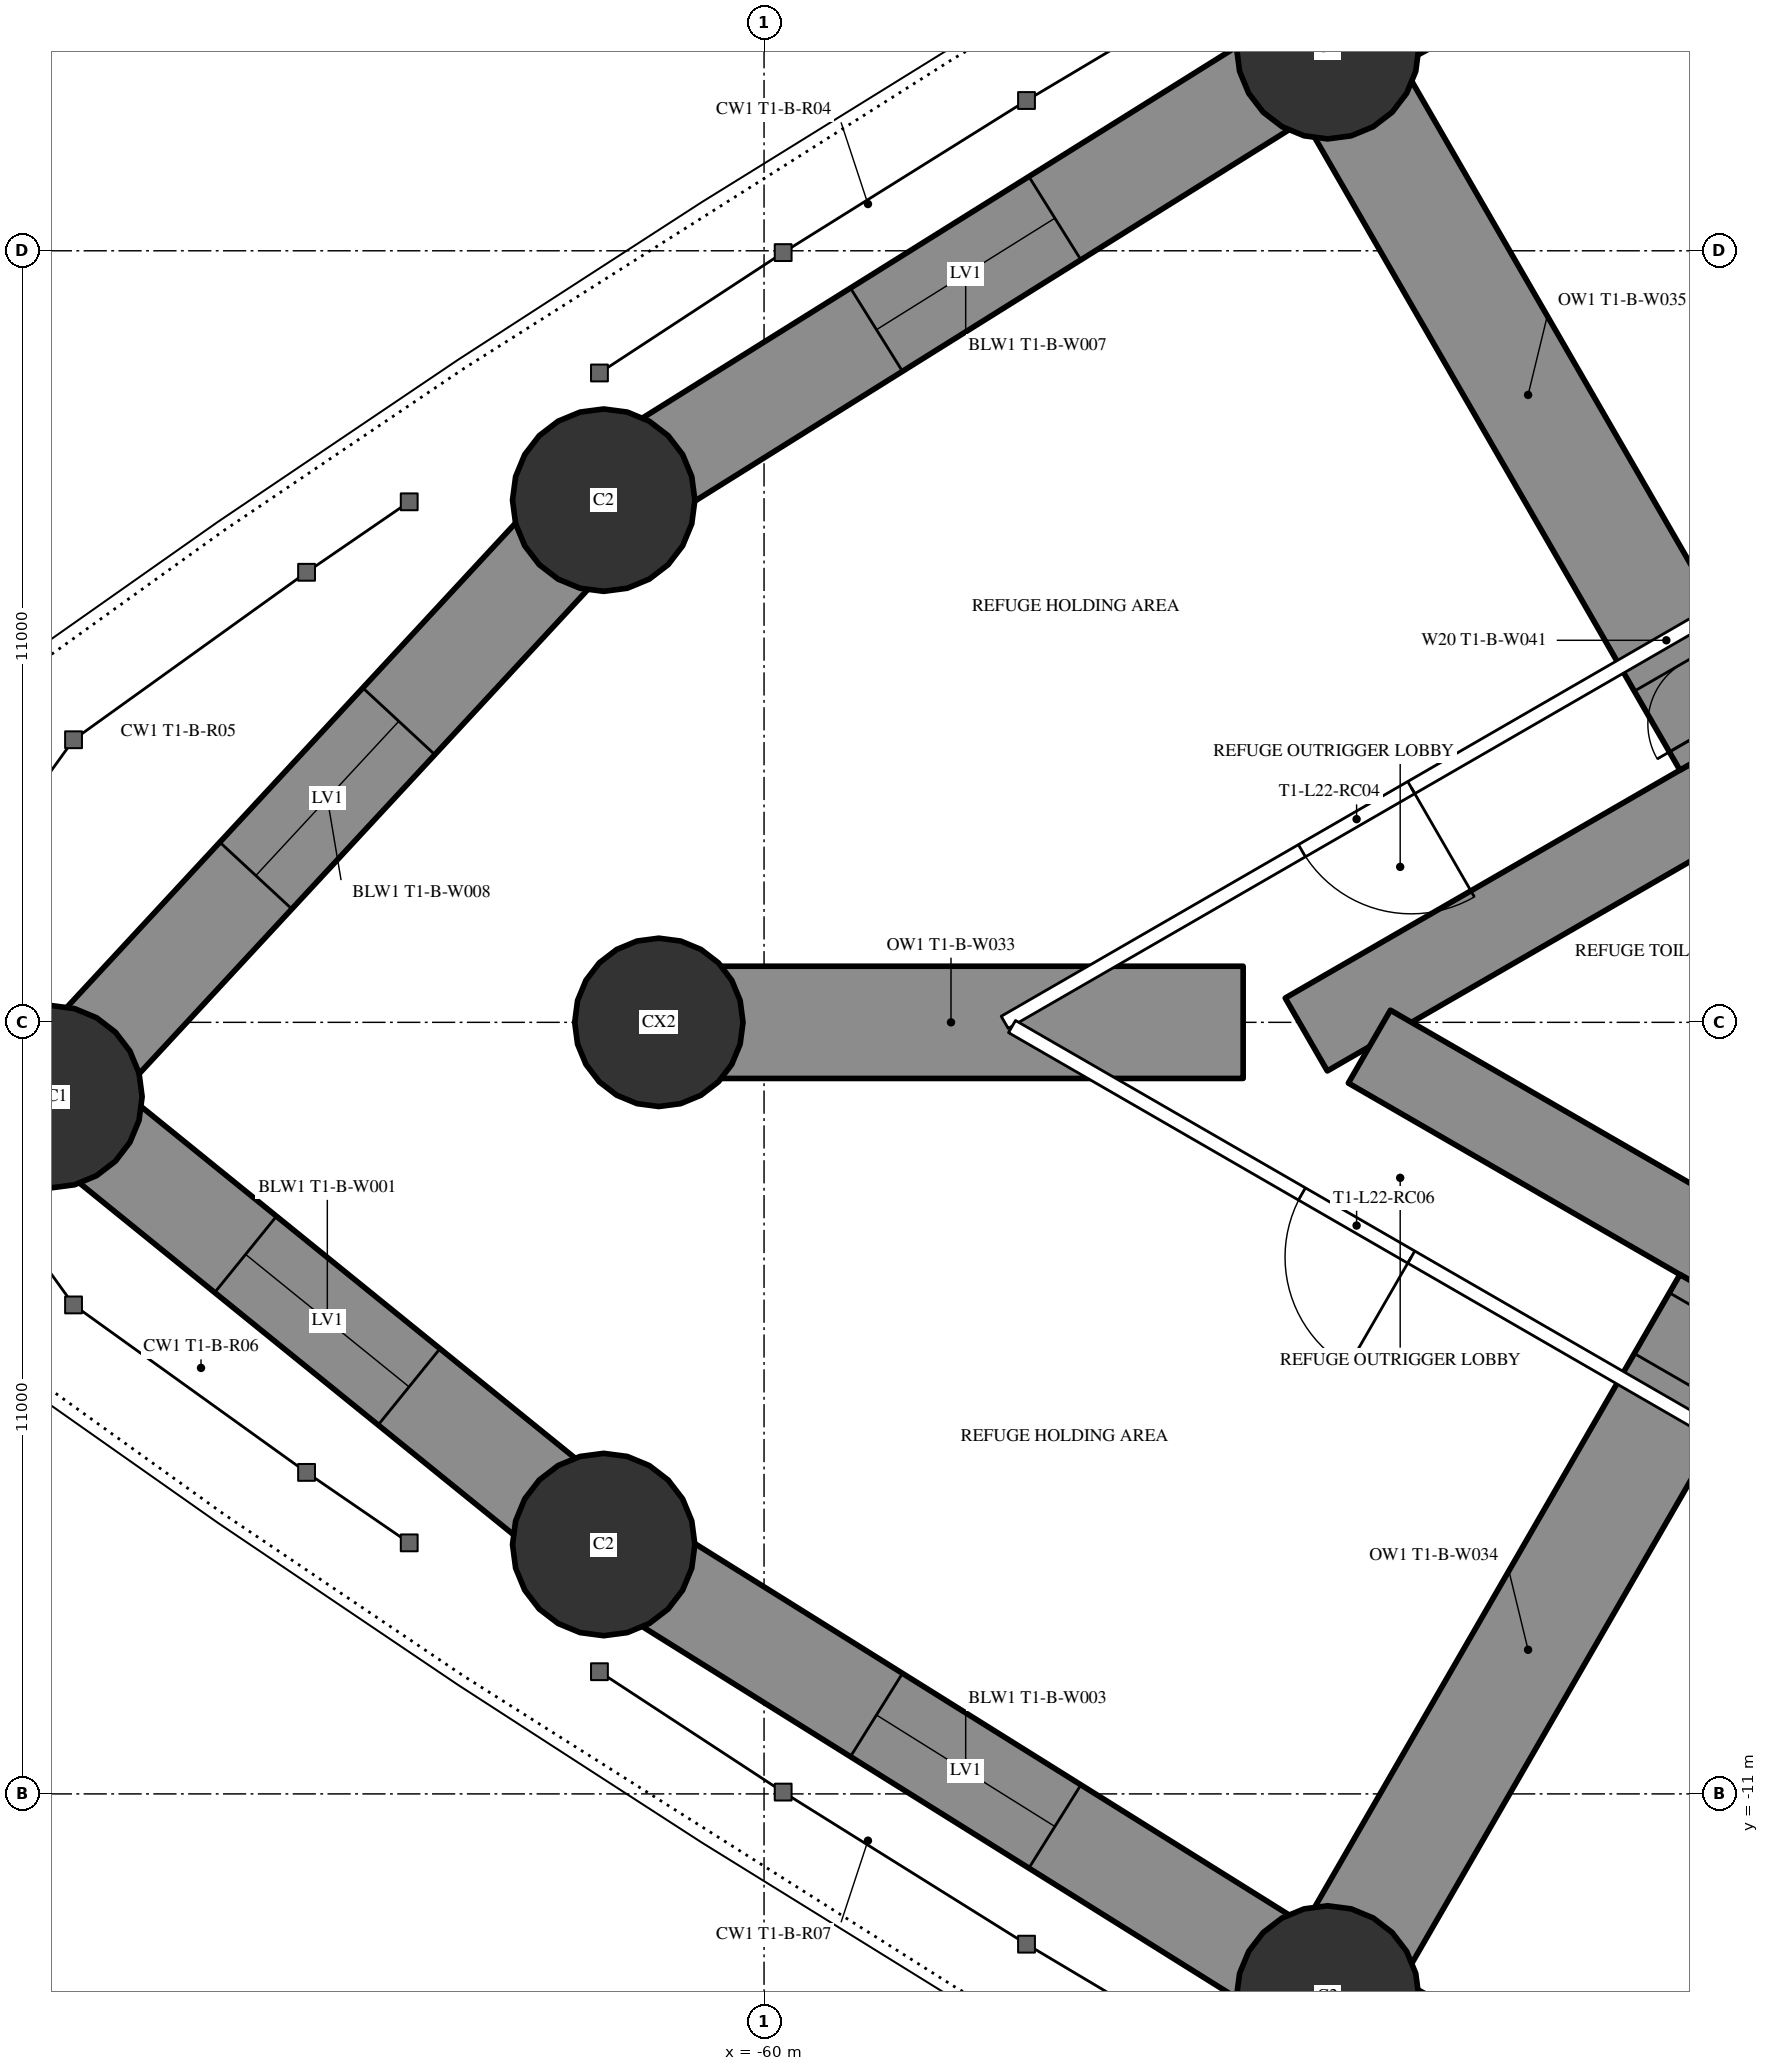
"""IFC4 building model, lengths in metres.
Left out: names, types, materials, properties, quantities, classifications, styles, units other than length and angle.
Written with IfcOpenShell. Run it as: python <this file> out.ifc"""

import sys

from ifc_helpers import new_model, si_unit, direction, frame, frame_2d, origin, origin_2d, place, context, subcontext, project, spatial, rectangle, circle, hollow_circle, extrude, element, fill, save


model = new_model("IFC4")
c1 = context("Model", 3, precision=1e-05, world=origin(), true_north=direction((0.0, 1.0)))
c2 = subcontext(c1, "Body", "Model", "MODEL_VIEW")
j1 = project(units=[si_unit("LENGTHUNIT", "METRE"), si_unit("PLANEANGLEUNIT", "RADIAN")], contexts=[c1])
p1 = place(None, origin())
s1 = spatial("IfcSite", under=j1, at=p1, CompositionType="ELEMENT")
p2 = place(p1, origin())
s2 = spatial("IfcBuilding", under=s1, at=p2, CompositionType="ELEMENT")
p3 = place(p2, frame((0.0, 0.0, 87.0)))
s3 = spatial("IfcBuildingStorey", under=s2, at=p3, CompositionType="ELEMENT", Elevation=87.0)
for number, where, z_axis, x_axis in (
    (1, (-70.168, -1.06, 0.0), (0.0, 0.0, 1.0), (1.0, 0.0, 0.0)),
    (2, (-62.287, -7.445, 0.0), (0.0, 0.0, 1.0), (1.0, 0.0, 0.0)),
    (3, (-51.963, -13.895, 0.0), (0.0, 0.0, 1.0), (1.0, 0.0, 0.0)),
    (4, (-51.963, 13.895, 0.0), (0.0, 0.0, 1.0), (1.0, 0.0, 0.0)),
    (5, (-62.287, 7.445, 0.0), (0.0, 0.0, 1.0), (1.0, 0.0, 0.0)),
):
    element("IfcColumn", number, at=place(p3, frame(where, z_axis=z_axis, x_axis=x_axis)), inside=s3, PredefinedType="COLUMN", context=c2, shape_type="SweptSolid", body=[
        extrude(hollow_circle(Radius=1.3, WallThickness=0.1, at=origin_2d()), origin(), (0.0, 0.0, 1.0), 3.6),
    ])
p4 = place(p3, frame((-61.5, 0.0, 0.0), z_axis=(0.0, 0.0, 1.0), x_axis=(1.0, 0.0, 0.0)))
e6 = element("IfcColumn", 6, at=p4, inside=s3, PredefinedType="COLUMN", context=c2, shape_type="SweptSolid", body=[
    extrude(circle(Radius=1.2, at=origin_2d()), origin(), (0.0, 0.0, 1.0), 3.6),
])
p5 = place(p3, frame((-27.2, 14.3, 0.0), z_axis=(0.0, 0.0, 1.0), x_axis=(-0.866026593062, -0.499997940104, 0.0)))
e7 = element("IfcWall", 7, at=p5, inside=s3, PredefinedType="SHEAR", context=c2, shape_type="SweptSolid", body=[
    extrude(rectangle(XDim=28.946, YDim=1.2, at=frame_2d((14.473, 0.0))), origin(), (0.0, 0.0, 1.0), 3.6),
])
p6 = place(p5, frame((4.6, 0.0, 0.0)))
e8 = element("IfcOpeningElement", 8, at=p6, cuts=e7, PredefinedType="OPENING", context=c2, shape_type="SweptSolid", body=[
    extrude(rectangle(XDim=1.0, YDim=2.2, at=frame_2d((0.5, 1.1))), frame((0.0, 0.61, 0.0), z_axis=(0.0, -1.0, 0.0), x_axis=(1.0, 0.0, 0.0)), (0.0, 0.0, 1.0), 1.22),
])
p7 = place(p5, frame((13.568, 0.0, 0.0)))
e9 = element("IfcOpeningElement", 9, at=p7, cuts=e7, PredefinedType="OPENING", context=c2, shape_type="SweptSolid", body=[
    extrude(rectangle(XDim=1.8, YDim=2.03, at=frame_2d((0.9, 1.015))), frame((0.0, 0.61, 0.0), z_axis=(0.0, -1.0, 0.0), x_axis=(1.0, 0.0, 0.0)), (0.0, 0.0, 1.0), 1.22),
])
p8 = place(p3, frame((-27.2, -14.3, 0.0), z_axis=(0.0, 0.0, 1.0), x_axis=(-0.866024021859, 0.500002393557, 0.0)))
e10 = element("IfcWall", 10, at=p8, inside=s3, PredefinedType="SHEAR", context=c2, shape_type="SweptSolid", body=[
    extrude(rectangle(XDim=27.907, YDim=1.2, at=frame_2d((13.954, 0.0))), origin(), (0.0, 0.0, 1.0), 3.6),
])
p9 = place(p8, frame((4.6, 0.0, 0.0)))
e11 = element("IfcOpeningElement", 11, at=p9, cuts=e10, PredefinedType="OPENING", context=c2, shape_type="SweptSolid", body=[
    extrude(rectangle(XDim=1.0, YDim=2.2, at=frame_2d((0.5, 1.1))), frame((0.0, 0.61, 0.0), z_axis=(0.0, -1.0, 0.0), x_axis=(1.0, 0.0, 0.0)), (0.0, 0.0, 1.0), 1.22),
])
p10 = place(p8, frame((13.818, 0.0, 0.0)))
e12 = element("IfcOpeningElement", 12, at=p10, cuts=e10, PredefinedType="OPENING", context=c2, shape_type="SweptSolid", body=[
    extrude(rectangle(XDim=1.8, YDim=2.2, at=frame_2d((0.9, 1.1))), frame((0.0, 0.61, 0.0), z_axis=(0.0, -1.0, 0.0), x_axis=(1.0, 0.0, 0.0)), (0.0, 0.0, 1.0), 1.22),
])
p11 = place(p3, frame((-46.248, 3.996, 0.0), z_axis=(0.0, 0.0, 1.0), x_axis=(-0.499993613132, 0.866029091213, 0.0)))
e13 = element("IfcWall", 13, at=p11, inside=s3, PredefinedType="SHEAR", context=c2, shape_type="SweptSolid", body=[
    extrude(rectangle(XDim=11.431, YDim=1.6, at=frame_2d((5.715, 0.0))), origin(), (0.0, 0.0, 1.0), 3.6),
])
p12 = place(p11, frame((0.3, 0.0, 0.0)))
e14 = element("IfcOpeningElement", 14, at=p12, cuts=e13, PredefinedType="OPENING", context=c2, shape_type="SweptSolid", body=[
    extrude(rectangle(XDim=1.0, YDim=2.2, at=frame_2d((0.5, 1.1))), frame((0.0, 0.81, 0.0), z_axis=(0.0, -1.0, 0.0), x_axis=(1.0, 0.0, 0.0)), (0.0, 0.0, 1.0), 1.62),
])
p13 = place(p3, frame((-53.168, 0.0, 0.0), z_axis=(0.0, 0.0, 1.0), x_axis=(-1.0, 0.0, 0.0)))
e15 = element("IfcWall", 15, at=p13, inside=s3, PredefinedType="SHEAR", context=c2, shape_type="SweptSolid", body=[
    extrude(rectangle(XDim=8.332, YDim=1.6, at=frame_2d((4.166, 0.0))), origin(), (0.0, 0.0, 1.0), 3.6),
])
p14 = place(p3, frame((-46.248, -3.996, 0.0), z_axis=(0.0, 0.0, 1.0), x_axis=(-0.499993613132, -0.866029091213, 0.0)))
e16 = element("IfcWall", 16, at=p14, inside=s3, PredefinedType="SHEAR", context=c2, shape_type="SweptSolid", body=[
    extrude(rectangle(XDim=11.431, YDim=1.6, at=frame_2d((5.715, 0.0))), origin(), (0.0, 0.0, 1.0), 3.6),
])
p15 = place(p14, frame((0.3, 0.0, 0.0)))
e17 = element("IfcOpeningElement", 17, at=p15, cuts=e16, PredefinedType="OPENING", context=c2, shape_type="SweptSolid", body=[
    extrude(rectangle(XDim=1.0, YDim=2.2, at=frame_2d((0.5, 1.1))), frame((0.0, 0.81, 0.0), z_axis=(0.0, -1.0, 0.0), x_axis=(1.0, 0.0, 0.0)), (0.0, 0.0, 1.0), 1.62),
])
p16 = place(p3, frame((-41.245, 19.666, 0.0), z_axis=(0.0, 0.0, 1.0), x_axis=(-0.880492350889, -0.474060354835, 0.0)))
e18 = element("IfcWall", 18, at=p16, inside=s3, PredefinedType="SHEAR", context=c2, shape_type="SweptSolid", body=[
    extrude(rectangle(XDim=12.173, YDim=1.4, at=frame_2d((6.086, 0.0))), origin(), (0.0, 0.0, 1.0), 3.6),
])
p17 = place(p16, frame((4.586, 0.0, 0.6)))
e19 = element("IfcOpeningElement", 19, at=p17, cuts=e18, PredefinedType="OPENING", context=c2, shape_type="SweptSolid", body=[
    extrude(rectangle(XDim=3.0, YDim=1.2, at=frame_2d((1.5, 0.6))), frame((0.0, 0.71, 0.0), z_axis=(0.0, -1.0, 0.0), x_axis=(1.0, 0.0, 0.0)), (0.0, 0.0, 1.0), 1.42),
])
p18 = place(p3, frame((-51.963, 13.895, 0.0), z_axis=(0.0, 0.0, 1.0), x_axis=(-0.848062521637, -0.529896177939, 0.0)))
e20 = element("IfcWall", 20, at=p18, inside=s3, PredefinedType="SHEAR", context=c2, shape_type="SweptSolid", body=[
    extrude(rectangle(XDim=12.173, YDim=1.4, at=frame_2d((6.086, 0.0))), origin(), (0.0, 0.0, 1.0), 3.6),
])
p19 = place(p18, frame((4.586, 0.0, 0.6)))
e21 = element("IfcOpeningElement", 21, at=p19, cuts=e20, PredefinedType="OPENING", context=c2, shape_type="SweptSolid", body=[
    extrude(rectangle(XDim=3.0, YDim=1.2, at=frame_2d((1.5, 0.6))), frame((0.0, 0.71, 0.0), z_axis=(0.0, -1.0, 0.0), x_axis=(1.0, 0.0, 0.0)), (0.0, 0.0, 1.0), 1.42),
])
p20 = place(p3, frame((-62.287, 7.445, 0.0), z_axis=(0.0, 0.0, 1.0), x_axis=(-0.679718253794, -0.733473309303, 0.0)))
e22 = element("IfcWall", 22, at=p20, inside=s3, PredefinedType="SHEAR", context=c2, shape_type="SweptSolid", body=[
    extrude(rectangle(XDim=11.595, YDim=1.4, at=frame_2d((5.797, 0.0))), origin(), (0.0, 0.0, 1.0), 3.6),
])
p21 = place(p20, frame((4.298, 0.0, 0.6)))
e23 = element("IfcOpeningElement", 23, at=p21, cuts=e22, PredefinedType="OPENING", context=c2, shape_type="SweptSolid", body=[
    extrude(rectangle(XDim=3.0, YDim=1.2, at=frame_2d((1.5, 0.6))), frame((0.0, 0.71, 0.0), z_axis=(0.0, -1.0, 0.0), x_axis=(1.0, 0.0, 0.0)), (0.0, 0.0, 1.0), 1.42),
])
p22 = place(p3, frame((-70.168, -1.06, 0.0), z_axis=(0.0, 0.0, 1.0), x_axis=(0.777033503891, -0.629459239213, 0.0)))
e24 = element("IfcWall", 24, at=p22, inside=s3, PredefinedType="SHEAR", context=c2, shape_type="SweptSolid", body=[
    extrude(rectangle(XDim=10.143, YDim=1.4, at=frame_2d((5.071, 0.0))), origin(), (0.0, 0.0, 1.0), 3.6),
])
p23 = place(p22, frame((3.572, 0.0, 0.6)))
e25 = element("IfcOpeningElement", 25, at=p23, cuts=e24, PredefinedType="OPENING", context=c2, shape_type="SweptSolid", body=[
    extrude(rectangle(XDim=3.0, YDim=1.2, at=frame_2d((1.5, 0.6))), frame((0.0, 0.71, 0.0), z_axis=(0.0, -1.0, 0.0), x_axis=(1.0, 0.0, 0.0)), (0.0, 0.0, 1.0), 1.42),
])
p24 = place(p3, frame((-62.287, -7.445, 0.0), z_axis=(0.0, 0.0, 1.0), x_axis=(0.848062521637, -0.529896177939, 0.0)))
e26 = element("IfcWall", 26, at=p24, inside=s3, PredefinedType="SHEAR", context=c2, shape_type="SweptSolid", body=[
    extrude(rectangle(XDim=12.173, YDim=1.4, at=frame_2d((6.086, 0.0))), origin(), (0.0, 0.0, 1.0), 3.6),
])
p25 = place(p24, frame((4.586, 0.0, 0.6)))
e27 = element("IfcOpeningElement", 27, at=p25, cuts=e26, PredefinedType="OPENING", context=c2, shape_type="SweptSolid", body=[
    extrude(rectangle(XDim=3.0, YDim=1.2, at=frame_2d((1.5, 0.6))), frame((0.0, 0.71, 0.0), z_axis=(0.0, -1.0, 0.0), x_axis=(1.0, 0.0, 0.0)), (0.0, 0.0, 1.0), 1.42),
])
p26 = place(p3, frame((-51.963, -13.895, 0.0), z_axis=(0.0, 0.0, 1.0), x_axis=(0.880492350889, -0.474060354835, 0.0)))
e28 = element("IfcWall", 28, at=p26, inside=s3, PredefinedType="SHEAR", context=c2, shape_type="SweptSolid", body=[
    extrude(rectangle(XDim=12.173, YDim=1.4, at=frame_2d((6.086, 0.0))), origin(), (0.0, 0.0, 1.0), 3.6),
])
p27 = place(p26, frame((4.586, 0.0, 0.6)))
e29 = element("IfcOpeningElement", 29, at=p27, cuts=e28, PredefinedType="OPENING", context=c2, shape_type="SweptSolid", body=[
    extrude(rectangle(XDim=3.0, YDim=1.2, at=frame_2d((1.5, 0.6))), frame((0.0, 0.71, 0.0), z_axis=(0.0, -1.0, 0.0), x_axis=(1.0, 0.0, 0.0)), (0.0, 0.0, 1.0), 1.42),
])
p28 = place(p3, frame((-37.7, 10.894, 0.0), z_axis=(0.0, 0.0, 1.0), x_axis=(-0.866027905338, -0.499995667157, 0.0)))
e30 = element("IfcWall", 30, at=p28, inside=s3, PredefinedType="PARTITIONING", context=c2, shape_type="SweptSolid", body=[
    extrude(rectangle(XDim=21.787, YDim=0.2, at=frame_2d((10.894, 0.0))), origin(), (0.0, 0.0, 1.0), 3.35),
])
p29 = place(p28, frame((15.094, 0.0, 0.0)))
e31 = element("IfcOpeningElement", 31, at=p29, cuts=e30, PredefinedType="OPENING", context=c2, shape_type="SweptSolid", body=[
    extrude(rectangle(XDim=1.8, YDim=2.2, at=frame_2d((0.9, 1.1))), frame((0.0, 0.11, 0.0), z_axis=(0.0, -1.0, 0.0), x_axis=(1.0, 0.0, 0.0)), (0.0, 0.0, 1.0), 0.22),
])
p30 = place(p28, frame((4.201, 0.0, 0.0)))
e32 = element("IfcOpeningElement", 32, at=p30, cuts=e30, PredefinedType="OPENING", context=c2, shape_type="SweptSolid", body=[
    extrude(rectangle(XDim=1.8, YDim=2.2, at=frame_2d((0.9, 1.1))), frame((0.0, 0.11, 0.0), z_axis=(0.0, -1.0, 0.0), x_axis=(1.0, 0.0, 0.0)), (0.0, 0.0, 1.0), 0.22),
])
p31 = place(p3, frame((-36.92, -11.344, 0.0), z_axis=(0.0, 0.0, 1.0), x_axis=(-0.866028313256, 0.499994960614, 0.0)))
e33 = element("IfcWall", 33, at=p31, inside=s3, PredefinedType="PARTITIONING", context=c2, shape_type="SweptSolid", body=[
    extrude(rectangle(XDim=22.568, YDim=0.2, at=frame_2d((11.284, 0.0))), origin(), (0.0, 0.0, 1.0), 3.35),
])
p32 = place(p31, frame((15.994, 0.0, 0.0)))
e34 = element("IfcOpeningElement", 34, at=p32, cuts=e33, PredefinedType="OPENING", context=c2, shape_type="SweptSolid", body=[
    extrude(rectangle(XDim=1.8, YDim=2.2, at=frame_2d((0.9, 1.1))), frame((0.0, 0.11, 0.0), z_axis=(0.0, -1.0, 0.0), x_axis=(1.0, 0.0, 0.0)), (0.0, 0.0, 1.0), 0.22),
])
p33 = place(p31, frame((4.551, 0.0, 0.0)))
e35 = element("IfcOpeningElement", 35, at=p33, cuts=e33, PredefinedType="OPENING", context=c2, shape_type="SweptSolid", body=[
    extrude(rectangle(XDim=2.0, YDim=2.4, at=frame_2d((1.0, 1.2))), frame((0.0, 0.11, 0.0), z_axis=(0.0, -1.0, 0.0), x_axis=(1.0, 0.0, 0.0)), (0.0, 0.0, 1.0), 0.22),
])
p34 = place(p19, origin())
e36 = element("IfcWindow", 36, at=p34, inside=s3, PartitioningType="SINGLE_PANEL", PredefinedType="WINDOW", context=c2, shape_type="SweptSolid", body=[
    extrude(rectangle(XDim=3.0, YDim=1.2, at=frame_2d((1.5, 0.6))), frame((0.0, 0.03, 0.0), z_axis=(0.0, -1.0, 0.0), x_axis=(1.0, 0.0, 0.0)), (0.0, 0.0, 1.0), 0.06),
])
fill(e21, e36)
p35 = place(p21, origin())
e37 = element("IfcWindow", 37, at=p35, inside=s3, PartitioningType="SINGLE_PANEL", PredefinedType="WINDOW", context=c2, shape_type="SweptSolid", body=[
    extrude(rectangle(XDim=3.0, YDim=1.2, at=frame_2d((1.5, 0.6))), frame((0.0, 0.03, 0.0), z_axis=(0.0, -1.0, 0.0), x_axis=(1.0, 0.0, 0.0)), (0.0, 0.0, 1.0), 0.06),
])
fill(e23, e37)
p36 = place(p23, origin())
e38 = element("IfcWindow", 38, at=p36, inside=s3, PartitioningType="SINGLE_PANEL", PredefinedType="WINDOW", context=c2, shape_type="SweptSolid", body=[
    extrude(rectangle(XDim=3.0, YDim=1.2, at=frame_2d((1.5, 0.6))), frame((0.0, 0.03, 0.0), z_axis=(0.0, -1.0, 0.0), x_axis=(1.0, 0.0, 0.0)), (0.0, 0.0, 1.0), 0.06),
])
fill(e25, e38)
p37 = place(p25, origin())
e39 = element("IfcWindow", 39, at=p37, inside=s3, PartitioningType="SINGLE_PANEL", PredefinedType="WINDOW", context=c2, shape_type="SweptSolid", body=[
    extrude(rectangle(XDim=3.0, YDim=1.2, at=frame_2d((1.5, 0.6))), frame((0.0, 0.03, 0.0), z_axis=(0.0, -1.0, 0.0), x_axis=(1.0, 0.0, 0.0)), (0.0, 0.0, 1.0), 0.06),
])
fill(e27, e39)
p38 = place(p12, origin())
e40 = element("IfcDoor", 40, at=p38, inside=s3, OperationType="SINGLE_SWING_LEFT", PredefinedType="DOOR", context=c2, shape_type="SweptSolid", body=[
    extrude(rectangle(XDim=1.0, YDim=2.2, at=frame_2d((0.5, 1.1))), frame((0.0, 0.025, 0.0), z_axis=(0.0, -1.0, 0.0), x_axis=(1.0, 0.0, 0.0)), (0.0, 0.0, 1.0), 0.05),
])
fill(e14, e40)
p39 = place(p15, origin())
e41 = element("IfcDoor", 41, at=p39, inside=s3, OperationType="SINGLE_SWING_LEFT", PredefinedType="DOOR", context=c2, shape_type="SweptSolid", body=[
    extrude(rectangle(XDim=1.0, YDim=2.2, at=frame_2d((0.5, 1.1))), frame((0.0, 0.025, 0.0), z_axis=(0.0, -1.0, 0.0), x_axis=(1.0, 0.0, 0.0)), (0.0, 0.0, 1.0), 0.05),
])
fill(e17, e41)
p40 = place(p29, origin())
e42 = element("IfcDoor", 42, at=p40, inside=s3, OperationType="DOUBLE_DOOR_SINGLE_SWING", PredefinedType="DOOR", context=c2, shape_type="SweptSolid", body=[
    extrude(rectangle(XDim=1.8, YDim=2.2, at=frame_2d((0.9, 1.1))), frame((0.0, 0.025, 0.0), z_axis=(0.0, -1.0, 0.0), x_axis=(1.0, 0.0, 0.0)), (0.0, 0.0, 1.0), 0.05),
])
fill(e31, e42)
p41 = place(p32, origin())
e43 = element("IfcDoor", 43, at=p41, inside=s3, OperationType="DOUBLE_DOOR_SINGLE_SWING", PredefinedType="DOOR", context=c2, shape_type="SweptSolid", body=[
    extrude(rectangle(XDim=1.8, YDim=2.2, at=frame_2d((0.9, 1.1))), frame((0.0, 0.025, 0.0), z_axis=(0.0, -1.0, 0.0), x_axis=(1.0, 0.0, 0.0)), (0.0, 0.0, 1.0), 0.05),
])
fill(e34, e43)
save(model, sys.argv[1])
